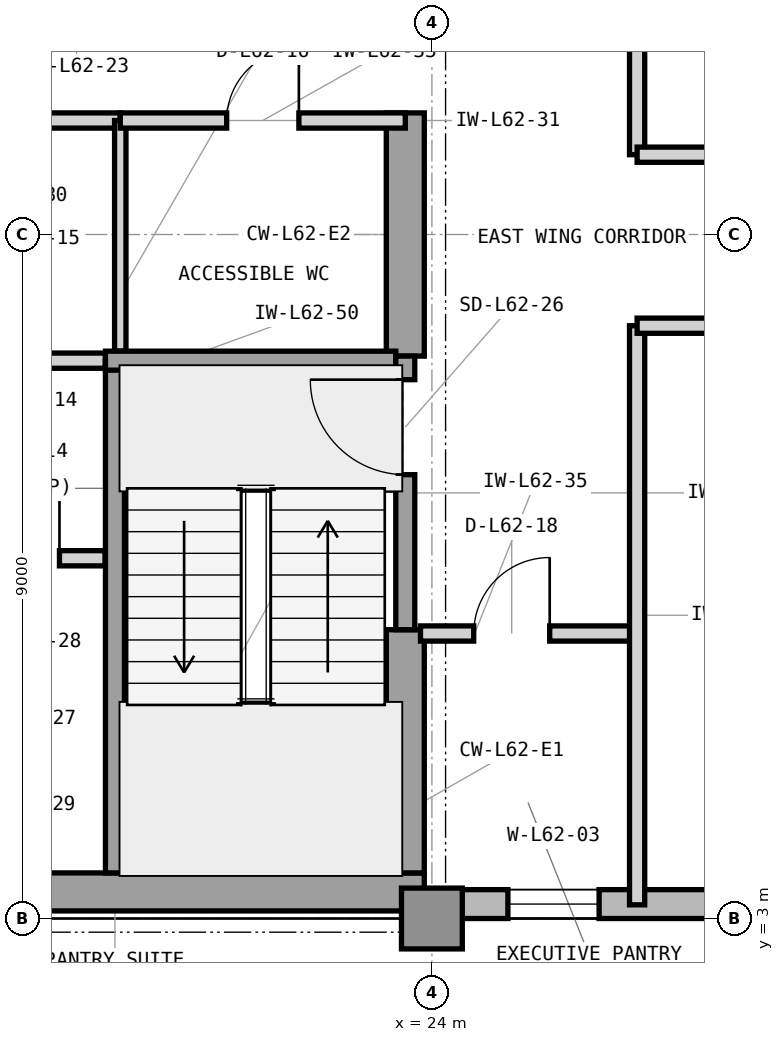
"""IFC4 building model, lengths in metres.
Left out: names, types, materials, properties, quantities, classifications, styles, units other than length and angle.
Written with IfcOpenShell. Run it as: python <this file> out.ifc"""

import sys

from ifc_helpers import new_model, si_unit, direction, frame, frame_2d, origin, origin_2d, place, context, subcontext, project, spatial, rectangle, extrude, element, fill, save


model = new_model("IFC4")
c1 = context("Model", 3, precision=1e-05, world=origin(), true_north=direction((0.0, 1.0)))
c2 = subcontext(c1, "Body", "Model", "MODEL_VIEW")
j1 = project(units=[si_unit("LENGTHUNIT", "METRE"), si_unit("PLANEANGLEUNIT", "RADIAN")], contexts=[c1])
p1 = place(None, origin())
s1 = spatial("IfcSite", under=j1, at=p1, CompositionType="ELEMENT")
p2 = place(p1, origin())
s2 = spatial("IfcBuilding", under=s1, at=p2, CompositionType="ELEMENT")
p3 = place(p2, frame((0.0, 0.0, 254.7)))
s3 = spatial("IfcBuildingStorey", under=s2, at=p3, CompositionType="ELEMENT", Elevation=254.7)
p4 = place(p3, frame((7.475, 3.35, 0.0), z_axis=(0.0, 0.0, 1.0), x_axis=(1.0, 0.0, 0.0)))
e1 = element("IfcWall", 1, at=p4, inside=s3, PredefinedType="SHEAR", context=c2, shape_type="SweptSolid", body=[
    extrude(rectangle(XDim=16.425, YDim=0.5, at=frame_2d((8.212, 0.0))), origin(), (0.0, 0.0, 1.0), 3.9),
])
p5 = place(p3, frame((23.65, 3.6, 0.0), z_axis=(0.0, 0.0, 1.0), x_axis=(0.0, 1.0, 0.0)))
e2 = element("IfcWall", 2, at=p5, inside=s3, PredefinedType="SHEAR", context=c2, shape_type="SweptSolid", body=[
    extrude(rectangle(XDim=3.2, YDim=0.5, at=frame_2d((1.6, 0.0))), origin(), (0.0, 0.0, 1.0), 3.9),
])
p6 = place(p3, frame((23.65, 10.4, 0.0), z_axis=(0.0, 0.0, 1.0), x_axis=(0.0, 1.0, 0.0)))
e3 = element("IfcWall", 3, at=p6, inside=s3, PredefinedType="SHEAR", context=c2, shape_type="SweptSolid", body=[
    extrude(rectangle(XDim=3.2, YDim=0.5, at=frame_2d((1.6, 0.0))), origin(), (0.0, 0.0, 1.0), 3.9),
])
p7 = place(p3, frame((24.0, 3.0, 0.0), z_axis=(0.0, 0.0, 1.0), x_axis=(1.0, 0.0, 0.0)))
e4 = element("IfcColumn", 4, at=p7, inside=s3, PredefinedType="COLUMN", context=c2, shape_type="SweptSolid", body=[
    extrude(rectangle(XDim=0.8, YDim=0.8, at=origin_2d()), origin(), (0.0, 0.0, 1.0), 3.9),
])
p8 = place(p3, frame((23.9, 3.19, 0.0), z_axis=(0.0, 0.0, 1.0), x_axis=(1.0, 0.0, 0.0)))
e5 = element("IfcWall", 5, at=p8, inside=s3, PredefinedType="STANDARD", context=c2, shape_type="SweptSolid", body=[
    extrude(rectangle(XDim=28.5, YDim=0.38, at=frame_2d((14.25, 0.0))), origin(), (0.0, 0.0, 1.0), 3.715),
])
p9 = place(p8, frame((1.1, 0.0, 0.8)))
e6 = element("IfcOpeningElement", 6, at=p9, cuts=e5, PredefinedType="OPENING", context=c2, shape_type="SweptSolid", body=[
    extrude(rectangle(XDim=1.2, YDim=2.35, at=frame_2d((0.6, 1.175))), frame((0.0, 0.2, 0.0), z_axis=(0.0, -1.0, 0.0), x_axis=(1.0, 0.0, 0.0)), (0.0, 0.0, 1.0), 0.4),
])
p10 = place(p8, frame((5.504, 0.0, 0.8)))
e7 = element("IfcOpeningElement", 7, at=p10, cuts=e5, PredefinedType="OPENING", context=c2, shape_type="SweptSolid", body=[
    extrude(rectangle(XDim=2.6, YDim=2.35, at=frame_2d((1.3, 1.175))), frame((0.0, 0.2, 0.0), z_axis=(0.0, -1.0, 0.0), x_axis=(1.0, 0.0, 0.0)), (0.0, 0.0, 1.0), 0.4),
])
p11 = place(p8, frame((13.254, 0.0, 0.8)))
e8 = element("IfcOpeningElement", 8, at=p11, cuts=e5, PredefinedType="OPENING", context=c2, shape_type="SweptSolid", body=[
    extrude(rectangle(XDim=2.6, YDim=2.35, at=frame_2d((1.3, 1.175))), frame((0.0, 0.2, 0.0), z_axis=(0.0, -1.0, 0.0), x_axis=(1.0, 0.0, 0.0)), (0.0, 0.0, 1.0), 0.4),
])
p12 = place(p8, frame((19.154, 0.0, 0.8)))
e9 = element("IfcOpeningElement", 9, at=p12, cuts=e5, PredefinedType="OPENING", context=c2, shape_type="SweptSolid", body=[
    extrude(rectangle(XDim=2.6, YDim=2.35, at=frame_2d((1.3, 1.175))), frame((0.0, 0.2, 0.0), z_axis=(0.0, -1.0, 0.0), x_axis=(1.0, 0.0, 0.0)), (0.0, 0.0, 1.0), 0.4),
])
p13 = place(p3, frame((17.5, 7.74, 0.0), z_axis=(0.0, 0.0, 1.0), x_axis=(1.0, 0.0, 0.0)))
e10 = element("IfcWall", 10, at=p13, inside=s3, PredefinedType="PARTITIONING", context=c2, shape_type="SweptSolid", body=[
    extrude(rectangle(XDim=2.2, YDim=0.2, at=frame_2d((1.1, 0.0))), origin(), (0.0, 0.0, 1.0), 3.705),
])
p14 = place(p13, frame((0.6, 0.0, 0.0)))
e11 = element("IfcOpeningElement", 11, at=p14, cuts=e10, PredefinedType="OPENING", context=c2, shape_type="SweptSolid", body=[
    extrude(rectangle(XDim=1.0, YDim=2.15, at=frame_2d((0.5, 1.075))), frame((0.0, 0.11, 0.0), z_axis=(0.0, -1.0, 0.0), x_axis=(1.0, 0.0, 0.0)), (0.0, 0.0, 1.0), 0.22),
])
p15 = place(p3, frame((14.825, 10.34, 0.0), z_axis=(0.0, 0.0, 1.0), x_axis=(1.0, 0.0, 0.0)))
e12 = element("IfcWall", 12, at=p15, inside=s3, PredefinedType="PARTITIONING", context=c2, shape_type="SweptSolid", body=[
    extrude(rectangle(XDim=4.88, YDim=0.2, at=frame_2d((2.44, 0.0))), origin(), (0.0, 0.0, 1.0), 3.088),
])
p16 = place(p3, frame((14.7, 13.5, 0.0), z_axis=(0.0, 0.0, 1.0), x_axis=(1.0, 0.0, 0.0)))
e13 = element("IfcWall", 13, at=p16, inside=s3, PredefinedType="PARTITIONING", context=c2, shape_type="SweptSolid", body=[
    extrude(rectangle(XDim=5.2, YDim=0.2, at=frame_2d((2.6, 0.0))), origin(), (0.0, 0.0, 1.0), 3.088),
])
p17 = place(p16, frame((2.125, 0.0, 0.0)))
e14 = element("IfcOpeningElement", 14, at=p17, cuts=e13, PredefinedType="OPENING", context=c2, shape_type="SweptSolid", body=[
    extrude(rectangle(XDim=0.95, YDim=2.1, at=frame_2d((0.475, 1.05))), frame((0.0, 0.11, 0.0), z_axis=(0.0, -1.0, 0.0), x_axis=(1.0, 0.0, 0.0)), (0.0, 0.0, 1.0), 0.22),
])
p18 = place(p3, frame((19.9, 10.465, 0.0), z_axis=(0.0, 0.0, 1.0), x_axis=(0.0, 1.0, 0.0)))
e15 = element("IfcWall", 15, at=p18, inside=s3, PredefinedType="PARTITIONING", context=c2, shape_type="SweptSolid", body=[
    extrude(rectangle(XDim=3.035, YDim=0.15, at=frame_2d((1.518, 0.0))), origin(), (0.0, 0.0, 1.0), 3.705),
])
p19 = place(p3, frame((19.9, 13.5, 0.0), z_axis=(0.0, 0.0, 1.0), x_axis=(1.0, 0.0, 0.0)))
e16 = element("IfcWall", 16, at=p19, inside=s3, PredefinedType="PARTITIONING", context=c2, shape_type="SweptSolid", body=[
    extrude(rectangle(XDim=3.75, YDim=0.2, at=frame_2d((1.875, 0.0))), origin(), (0.0, 0.0, 1.0), 3.088),
])
p20 = place(p19, frame((1.4, 0.0, 0.0)))
e17 = element("IfcOpeningElement", 17, at=p20, cuts=e16, PredefinedType="OPENING", context=c2, shape_type="SweptSolid", body=[
    extrude(rectangle(XDim=0.95, YDim=2.1, at=frame_2d((0.475, 1.05))), frame((0.0, 0.11, 0.0), z_axis=(0.0, -1.0, 0.0), x_axis=(1.0, 0.0, 0.0)), (0.0, 0.0, 1.0), 0.22),
])
p21 = place(p3, frame((23.85, 6.75, 0.0), z_axis=(0.0, 0.0, 1.0), x_axis=(1.0, 0.0, 0.0)))
e18 = element("IfcWall", 18, at=p21, inside=s3, PredefinedType="PARTITIONING", context=c2, shape_type="SweptSolid", body=[
    extrude(rectangle(XDim=2.85, YDim=0.2, at=frame_2d((1.425, 0.0))), origin(), (0.0, 0.0, 1.0), 3.705),
])
p22 = place(p21, frame((0.7, 0.0, 0.0)))
e19 = element("IfcOpeningElement", 19, at=p22, cuts=e18, PredefinedType="OPENING", context=c2, shape_type="SweptSolid", body=[
    extrude(rectangle(XDim=1.0, YDim=2.15, at=frame_2d((0.5, 1.075))), frame((0.0, 0.11, 0.0), z_axis=(0.0, -1.0, 0.0), x_axis=(1.0, 0.0, 0.0)), (0.0, 0.0, 1.0), 0.22),
])
p23 = place(p3, frame((26.7, 3.18, 0.0), z_axis=(0.0, 0.0, 1.0), x_axis=(0.0, 1.0, 0.0)))
e20 = element("IfcWall", 20, at=p23, inside=s3, PredefinedType="PARTITIONING", context=c2, shape_type="SweptSolid", body=[
    extrude(rectangle(XDim=7.62, YDim=0.2, at=frame_2d((3.81, 0.0))), origin(), (0.0, 0.0, 1.0), 3.705),
])
p24 = place(p3, frame((26.7, 13.05, 0.0), z_axis=(0.0, 0.0, 1.0), x_axis=(0.0, 1.0, 0.0)))
e21 = element("IfcWall", 21, at=p24, inside=s3, PredefinedType="PARTITIONING", context=c2, shape_type="SweptSolid", body=[
    extrude(rectangle(XDim=6.33, YDim=0.2, at=frame_2d((3.165, 0.0))), origin(), (0.0, 0.0, 1.0), 3.705),
])
p25 = place(p3, frame((26.7, 10.8, 0.0), z_axis=(0.0, 0.0, 1.0), x_axis=(1.0, 0.0, 0.0)))
e22 = element("IfcWall", 22, at=p25, inside=s3, PredefinedType="PARTITIONING", context=c2, shape_type="SweptSolid", body=[
    extrude(rectangle(XDim=8.0, YDim=0.2, at=frame_2d((4.0, 0.0))), origin(), (0.0, 0.0, 1.0), 3.705),
])
p26 = place(p25, frame((3.0, 0.0, 0.0)))
e23 = element("IfcOpeningElement", 23, at=p26, cuts=e22, PredefinedType="OPENING", context=c2, shape_type="SweptSolid", body=[
    extrude(rectangle(XDim=2.0, YDim=2.5, at=frame_2d((1.0, 1.25))), frame((0.0, 0.11, 0.0), z_axis=(0.0, -1.0, 0.0), x_axis=(1.0, 0.0, 0.0)), (0.0, 0.0, 1.0), 0.22),
])
p27 = place(p3, frame((26.7, 13.05, 0.0), z_axis=(0.0, 0.0, 1.0), x_axis=(1.0, 0.0, 0.0)))
e24 = element("IfcWall", 24, at=p27, inside=s3, PredefinedType="PARTITIONING", context=c2, shape_type="SweptSolid", body=[
    extrude(rectangle(XDim=8.5, YDim=0.2, at=frame_2d((4.25, 0.0))), origin(), (0.0, 0.0, 1.0), 3.705),
])
p28 = place(p27, frame((3.5, 0.0, 0.0)))
e25 = element("IfcOpeningElement", 25, at=p28, cuts=e24, PredefinedType="OPENING", context=c2, shape_type="SweptSolid", body=[
    extrude(rectangle(XDim=1.5, YDim=2.3, at=frame_2d((0.75, 1.15))), frame((0.0, 0.11, 0.0), z_axis=(0.0, -1.0, 0.0), x_axis=(1.0, 0.0, 0.0)), (0.0, 0.0, 1.0), 0.22),
])
p29 = place(p3, frame((19.83, 3.6, 0.0), z_axis=(0.0, 0.0, 1.0), x_axis=(0.0, 1.0, 0.0)))
e26 = element("IfcWall", 26, at=p29, inside=s3, PredefinedType="SHEAR", context=c2, shape_type="SweptSolid", body=[
    extrude(rectangle(XDim=6.74, YDim=0.25, at=frame_2d((3.37, 0.0))), origin(), (0.0, 0.0, 1.0), 3.9),
])
p30 = place(p3, frame((19.705, 10.34, 0.0), z_axis=(0.0, 0.0, 1.0), x_axis=(1.0, 0.0, 0.0)))
e27 = element("IfcWall", 27, at=p30, inside=s3, PredefinedType="SHEAR", context=c2, shape_type="SweptSolid", body=[
    extrude(rectangle(XDim=3.82, YDim=0.25, at=frame_2d((1.91, 0.0))), origin(), (0.0, 0.0, 1.0), 3.9),
])
p31 = place(p3, frame((23.65, 6.8, 0.0), z_axis=(0.0, 0.0, 1.0), x_axis=(0.0, 1.0, 0.0)))
e28 = element("IfcWall", 28, at=p31, inside=s3, PredefinedType="SHEAR", context=c2, shape_type="SweptSolid", body=[
    extrude(rectangle(XDim=3.6, YDim=0.25, at=frame_2d((1.8, 0.0))), origin(), (0.0, 0.0, 1.0), 3.9),
])
p32 = place(p31, frame((2.04, 0.0, 0.0)))
e29 = element("IfcOpeningElement", 29, at=p32, cuts=e28, PredefinedType="OPENING", context=c2, shape_type="SweptSolid", body=[
    extrude(rectangle(XDim=1.25, YDim=2.2, at=frame_2d((0.625, 1.1))), frame((0.0, 0.135, 0.0), z_axis=(0.0, -1.0, 0.0), x_axis=(1.0, 0.0, 0.0)), (0.0, 0.0, 1.0), 0.27),
])
p33 = place(p14, origin())
e30 = element("IfcDoor", 30, at=p33, inside=s3, OperationType="SINGLE_SWING_RIGHT", PredefinedType="DOOR", context=c2, shape_type="SweptSolid", body=[
    extrude(rectangle(XDim=1.0, YDim=2.15, at=frame_2d((0.5, 1.075))), frame((0.0, 0.025, 0.0), z_axis=(0.0, -1.0, 0.0), x_axis=(1.0, 0.0, 0.0)), (0.0, 0.0, 1.0), 0.05),
])
fill(e11, e30)
p34 = place(p20, origin())
e31 = element("IfcDoor", 31, at=p34, inside=s3, OperationType="SINGLE_SWING_RIGHT", PredefinedType="DOOR", context=c2, shape_type="SweptSolid", body=[
    extrude(rectangle(XDim=0.95, YDim=2.1, at=frame_2d((0.475, 1.05))), frame((0.0, 0.025, 0.0), z_axis=(0.0, -1.0, 0.0), x_axis=(1.0, 0.0, 0.0)), (0.0, 0.0, 1.0), 0.05),
])
fill(e17, e31)
p35 = place(p22, origin())
e32 = element("IfcDoor", 32, at=p35, inside=s3, OperationType="SINGLE_SWING_RIGHT", PredefinedType="DOOR", context=c2, shape_type="SweptSolid", body=[
    extrude(rectangle(XDim=1.0, YDim=2.15, at=frame_2d((0.5, 1.075))), frame((0.0, 0.025, 0.0), z_axis=(0.0, -1.0, 0.0), x_axis=(1.0, 0.0, 0.0)), (0.0, 0.0, 1.0), 0.05),
])
fill(e19, e32)
p36 = place(p32, origin())
e33 = element("IfcDoor", 33, at=p36, inside=s3, OperationType="SINGLE_SWING_RIGHT", PredefinedType="DOOR", context=c2, shape_type="SweptSolid", body=[
    extrude(rectangle(XDim=1.25, YDim=2.2, at=frame_2d((0.625, 1.1))), frame((0.0, 0.025, 0.0), z_axis=(0.0, -1.0, 0.0), x_axis=(1.0, 0.0, 0.0)), (0.0, 0.0, 1.0), 0.05),
])
fill(e29, e33)
p37 = place(p9, origin())
e34 = element("IfcWindow", 34, at=p37, inside=s3, PartitioningType="SINGLE_PANEL", PredefinedType="WINDOW", context=c2, shape_type="SweptSolid", body=[
    extrude(rectangle(XDim=1.2, YDim=2.35, at=frame_2d((0.6, 1.175))), frame((0.0, 0.11, 0.0), z_axis=(0.0, -1.0, 0.0), x_axis=(1.0, 0.0, 0.0)), (0.0, 0.0, 1.0), 0.06),
])
fill(e6, e34)
save(model, sys.argv[1])
